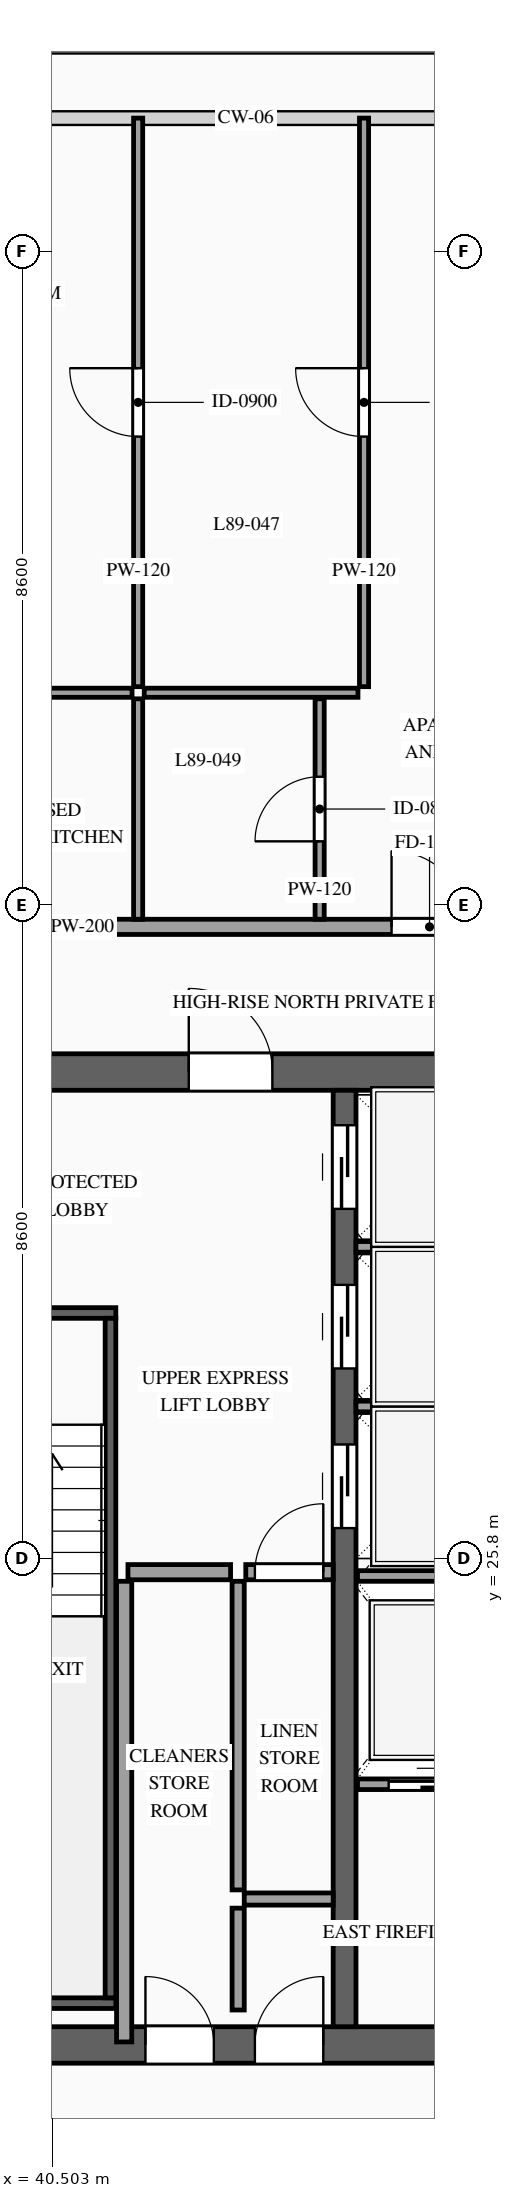
"""IFC4 building model, lengths in metres.
Left out: names, types, materials, properties, quantities, classifications, styles, units other than length and angle.
Written with IfcOpenShell. Run it as: python <this file> out.ifc"""

import sys

from ifc_helpers import new_model, si_unit, direction, frame, frame_2d, origin, place, context, subcontext, project, spatial, rectangle, extrude, source, transform, mapped, element, fill, save


model = new_model("IFC4")
c1 = context("Model", 3, precision=1e-05, world=origin(), true_north=direction((0.0, 1.0)))
c2 = subcontext(c1, "Body", "Model", "MODEL_VIEW")
j1 = project(units=[si_unit("LENGTHUNIT", "METRE"), si_unit("PLANEANGLEUNIT", "RADIAN")], contexts=[c1])
p1 = place(None, origin())
s1 = spatial("IfcSite", under=j1, at=p1, CompositionType="ELEMENT")
p2 = place(p1, origin())
s2 = spatial("IfcBuilding", under=s1, at=p2, CompositionType="ELEMENT")
p3 = place(p2, frame((0.0, 0.0, 332.2)))
s3 = spatial("IfcBuildingStorey", under=s2, at=p3, CompositionType="ELEMENT", Elevation=332.2)
p4 = place(p3, frame((23.56, 19.4, 0.0), z_axis=(0.0, 0.0, 1.0), x_axis=(1.0, 0.0, 0.0)))
e1 = element("IfcWall", 1, at=p4, inside=s3, PredefinedType="SHEAR", context=c2, shape_type="SweptSolid", body=[
    extrude(rectangle(XDim=26.88, YDim=0.48, at=frame_2d((13.44, 0.0))), origin(), (0.0, 0.0, 1.0), 3.5),
])
p5 = place(p4, frame((1.89, 0.0, 0.0)))
e2 = element("IfcOpeningElement", 2, at=p5, cuts=e1, PredefinedType="OPENING", context=c2, shape_type="SweptSolid", body=[
    extrude(rectangle(XDim=1.1, YDim=2.2, at=frame_2d((0.55, 1.1))), frame((0.0, 0.255, 0.0), z_axis=(0.0, -1.0, 0.0), x_axis=(1.0, 0.0, 0.0)), (0.0, 0.0, 1.0), 0.51),
])
p6 = place(p4, frame((9.79, 0.0, 0.0)))
e3 = element("IfcOpeningElement", 3, at=p6, cuts=e1, PredefinedType="OPENING", context=c2, shape_type="SweptSolid", body=[
    extrude(rectangle(XDim=1.1, YDim=2.2, at=frame_2d((0.55, 1.1))), frame((0.0, 0.255, 0.0), z_axis=(0.0, -1.0, 0.0), x_axis=(1.0, 0.0, 0.0)), (0.0, 0.0, 1.0), 0.51),
])
p7 = place(p4, frame((22.99, 0.0, 0.0)))
e4 = element("IfcOpeningElement", 4, at=p7, cuts=e1, PredefinedType="OPENING", context=c2, shape_type="SweptSolid", body=[
    extrude(rectangle(XDim=1.1, YDim=2.2, at=frame_2d((0.55, 1.1))), frame((0.0, 0.255, 0.0), z_axis=(0.0, -1.0, 0.0), x_axis=(1.0, 0.0, 0.0)), (0.0, 0.0, 1.0), 0.51),
])
p8 = place(p4, frame((19.61, 0.0, 0.0)))
e5 = element("IfcOpeningElement", 5, at=p8, cuts=e1, PredefinedType="OPENING", context=c2, shape_type="SweptSolid", body=[
    extrude(rectangle(XDim=0.9, YDim=2.15, at=frame_2d((0.45, 1.075))), frame((0.0, 0.255, 0.0), z_axis=(0.0, -1.0, 0.0), x_axis=(1.0, 0.0, 0.0)), (0.0, 0.0, 1.0), 0.51),
])
p9 = place(p4, frame((18.17, 0.0, 0.0)))
e6 = element("IfcOpeningElement", 6, at=p9, cuts=e1, PredefinedType="OPENING", context=c2, shape_type="SweptSolid", body=[
    extrude(rectangle(XDim=0.9, YDim=2.15, at=frame_2d((0.45, 1.075))), frame((0.0, 0.255, 0.0), z_axis=(0.0, -1.0, 0.0), x_axis=(1.0, 0.0, 0.0)), (0.0, 0.0, 1.0), 0.51),
])
p10 = place(p3, frame((23.56, 32.2, 0.0), z_axis=(0.0, 0.0, 1.0), x_axis=(1.0, 0.0, 0.0)))
e7 = element("IfcWall", 7, at=p10, inside=s3, PredefinedType="SHEAR", context=c2, shape_type="SweptSolid", body=[
    extrude(rectangle(XDim=26.88, YDim=0.48, at=frame_2d((13.44, 0.0))), origin(), (0.0, 0.0, 1.0), 3.5),
])
p11 = place(p10, frame((4.51, 0.0, 0.0)))
e8 = element("IfcOpeningElement", 8, at=p11, cuts=e7, PredefinedType="OPENING", context=c2, shape_type="SweptSolid", body=[
    extrude(rectangle(XDim=0.9, YDim=2.15, at=frame_2d((0.45, 1.075))), frame((0.0, 0.255, 0.0), z_axis=(0.0, -1.0, 0.0), x_axis=(1.0, 0.0, 0.0)), (0.0, 0.0, 1.0), 0.51),
])
p12 = place(p10, frame((9.79, 0.0, 0.0)))
e9 = element("IfcOpeningElement", 9, at=p12, cuts=e7, PredefinedType="OPENING", context=c2, shape_type="SweptSolid", body=[
    extrude(rectangle(XDim=1.1, YDim=2.2, at=frame_2d((0.55, 1.1))), frame((0.0, 0.255, 0.0), z_axis=(0.0, -1.0, 0.0), x_axis=(1.0, 0.0, 0.0)), (0.0, 0.0, 1.0), 0.51),
])
p13 = place(p10, frame((15.64, 0.0, 0.0)))
e10 = element("IfcOpeningElement", 10, at=p13, cuts=e7, PredefinedType="OPENING", context=c2, shape_type="SweptSolid", body=[
    extrude(rectangle(XDim=1.1, YDim=2.2, at=frame_2d((0.55, 1.1))), frame((0.0, 0.255, 0.0), z_axis=(0.0, -1.0, 0.0), x_axis=(1.0, 0.0, 0.0)), (0.0, 0.0, 1.0), 0.51),
])
p14 = place(p10, frame((18.74, 0.0, 0.0)))
e11 = element("IfcOpeningElement", 11, at=p14, cuts=e7, PredefinedType="OPENING", context=c2, shape_type="SweptSolid", body=[
    extrude(rectangle(XDim=1.1, YDim=2.2, at=frame_2d((0.55, 1.1))), frame((0.0, 0.255, 0.0), z_axis=(0.0, -1.0, 0.0), x_axis=(1.0, 0.0, 0.0)), (0.0, 0.0, 1.0), 0.51),
])
p15 = place(p3, frame((44.35, 19.64, 0.0), z_axis=(0.0, 0.0, 1.0), x_axis=(0.0, 1.0, 0.0)))
e12 = element("IfcWall", 12, at=p15, inside=s3, PredefinedType="SOLIDWALL", context=c2, shape_type="SweptSolid", body=[
    extrude(rectangle(XDim=12.32, YDim=0.3, at=frame_2d((6.16, 0.0))), origin(), (0.0, 0.0, 1.0), 3.5),
])
p16 = place(p15, frame((6.56, 0.0, 0.0)))
e13 = element("IfcOpeningElement", 13, at=p16, cuts=e12, PredefinedType="OPENING", context=c2, shape_type="SweptSolid", body=[
    extrude(rectangle(XDim=1.1, YDim=2.2, at=frame_2d((0.55, 1.1))), frame((0.0, 0.165, 0.0), z_axis=(0.0, -1.0, 0.0), x_axis=(1.0, 0.0, 0.0)), (0.0, 0.0, 1.0), 0.33),
])
p17 = place(p15, frame((8.66, 0.0, 0.0)))
e14 = element("IfcOpeningElement", 14, at=p17, cuts=e12, PredefinedType="OPENING", context=c2, shape_type="SweptSolid", body=[
    extrude(rectangle(XDim=1.1, YDim=2.2, at=frame_2d((0.55, 1.1))), frame((0.0, 0.165, 0.0), z_axis=(0.0, -1.0, 0.0), x_axis=(1.0, 0.0, 0.0)), (0.0, 0.0, 1.0), 0.33),
])
p18 = place(p15, frame((10.76, 0.0, 0.0)))
e15 = element("IfcOpeningElement", 15, at=p18, cuts=e12, PredefinedType="OPENING", context=c2, shape_type="SweptSolid", body=[
    extrude(rectangle(XDim=1.1, YDim=2.2, at=frame_2d((0.55, 1.1))), frame((0.0, 0.165, 0.0), z_axis=(0.0, -1.0, 0.0), x_axis=(1.0, 0.0, 0.0)), (0.0, 0.0, 1.0), 0.33),
])
p19 = place(p3, frame((44.52, 22.83, 0.0), z_axis=(0.0, 0.0, 1.0), x_axis=(1.0, 0.0, 0.0)))
e16 = element("IfcWall", 16, at=p19, inside=s3, PredefinedType="SOLIDWALL", context=c2, shape_type="SweptSolid", body=[
    extrude(rectangle(XDim=1.92, YDim=0.14, at=frame_2d((0.96, 0.0))), origin(), (0.0, 0.0, 1.0), 3.28),
])
p20 = place(p19, frame((0.41, 0.0, 0.0)))
e17 = element("IfcOpeningElement", 17, at=p20, cuts=e16, PredefinedType="OPENING", context=c2, shape_type="SweptSolid", body=[
    extrude(rectangle(XDim=1.1, YDim=2.2, at=frame_2d((0.55, 1.1))), frame((0.0, 0.085, 0.0), z_axis=(0.0, -1.0, 0.0), x_axis=(1.0, 0.0, 0.0)), (0.0, 0.0, 1.0), 0.17),
])
m1 = source(origin(), c2, "Body", "SweptSolid", [
    extrude(rectangle(XDim=1.92, YDim=0.14, at=frame_2d((0.96, 0.0))), origin(), (0.0, 0.0, 1.0), 3.28),
])
p21 = place(p3, frame((44.52, 25.57, 0.0), z_axis=(0.0, 0.0, 1.0), x_axis=(1.0, 0.0, 0.0)))
e18 = element("IfcWall", 18, at=p21, inside=s3, PredefinedType="SOLIDWALL", context=c2, shape_type="MappedRepresentation", body=[
    mapped(m1, transform((0.0, 0.0, 0.0), scale=1.0)),
])
m2 = source(origin(), c2, "Body", "SweptSolid", [
    extrude(rectangle(XDim=2.0, YDim=0.14, at=frame_2d((1.0, 0.0))), origin(), (0.0, 0.0, 1.0), 3.28),
])
for number, where, z_axis, x_axis in (
    (19, (44.5, 27.8, 0.0), (0.0, 0.0, 1.0), (1.0, 0.0, 0.0)),
    (20, (44.5, 29.9, 0.0), (0.0, 0.0, 1.0), (1.0, 0.0, 0.0)),
):
    element("IfcWall", number, at=place(p3, frame(where, z_axis=z_axis, x_axis=x_axis)), inside=s3, PredefinedType="SOLIDWALL", context=c2, shape_type="MappedRepresentation", body=[
        mapped(m2, transform((0.0, 0.0, 0.0), scale=1.0)),
    ])
p22 = place(p3, frame((38.2, 29.03, 0.0), z_axis=(0.0, 0.0, 1.0), x_axis=(1.0, 0.0, 0.0)))
e21 = element("IfcWall", 21, at=p22, inside=s3, PredefinedType="SOLIDWALL", context=c2, shape_type="SweptSolid", body=[
    extrude(rectangle(XDim=3.14, YDim=0.14, at=frame_2d((1.57, 0.0))), origin(), (0.0, 0.0, 1.0), 3.28),
])
p23 = place(p22, frame((1.02, 0.0, 0.0)))
e22 = element("IfcOpeningElement", 22, at=p23, cuts=e21, PredefinedType="OPENING", context=c2, shape_type="SweptSolid", body=[
    extrude(rectangle(XDim=1.1, YDim=2.2, at=frame_2d((0.55, 1.1))), frame((0.0, 0.085, 0.0), z_axis=(0.0, -1.0, 0.0), x_axis=(1.0, 0.0, 0.0)), (0.0, 0.0, 1.0), 0.17),
])
m3 = source(origin(), c2, "Body", "SweptSolid", [
    extrude(rectangle(XDim=3.14, YDim=0.14, at=frame_2d((1.57, 0.0))), origin(), (0.0, 0.0, 1.0), 3.28),
])
p24 = place(p3, frame((38.2, 19.95, 0.0), z_axis=(0.0, 0.0, 1.0), x_axis=(1.0, 0.0, 0.0)))
e23 = element("IfcWall", 23, at=p24, inside=s3, PredefinedType="SOLIDWALL", context=c2, shape_type="MappedRepresentation", body=[
    mapped(m3, transform((0.0, 0.0, 0.0), scale=1.0)),
])
m4 = source(origin(), c2, "Body", "SweptSolid", [
    extrude(rectangle(XDim=8.94, YDim=0.14, at=frame_2d((4.47, 0.0))), origin(), (0.0, 0.0, 1.0), 3.28),
])
p25 = place(p3, frame((41.27, 20.02, 0.0), z_axis=(0.0, 0.0, 1.0), x_axis=(0.0, 1.0, 0.0)))
e24 = element("IfcWall", 24, at=p25, inside=s3, PredefinedType="SOLIDWALL", context=c2, shape_type="MappedRepresentation", body=[
    mapped(m4, transform((0.0, 0.0, 0.0), scale=1.0)),
])
m5 = source(origin(), c2, "Body", "SweptSolid", [
    extrude(rectangle(XDim=1.34, YDim=0.16, at=frame_2d((0.67, 0.0))), origin(), (0.0, 0.0, 1.0), 3.28),
])
p26 = place(p3, frame((42.95, 19.86, 0.0), z_axis=(0.0, 0.0, 1.0), x_axis=(0.0, 1.0, 0.0)))
e25 = element("IfcWall", 25, at=p26, inside=s3, PredefinedType="PARTITIONING", context=c2, shape_type="MappedRepresentation", body=[
    mapped(m5, transform((0.0, 0.0, 0.0), scale=1.0)),
])
m6 = source(origin(), c2, "Body", "SweptSolid", [
    extrude(rectangle(XDim=1.17, YDim=0.16, at=frame_2d((0.585, 0.0))), origin(), (0.0, 0.0, 1.0), 3.28),
])
p27 = place(p3, frame((43.03, 21.32, 0.0), z_axis=(0.0, 0.0, 1.0), x_axis=(1.0, 0.0, 0.0)))
e26 = element("IfcWall", 26, at=p27, inside=s3, PredefinedType="PARTITIONING", context=c2, shape_type="MappedRepresentation", body=[
    mapped(m6, transform((0.0, 0.0, 0.0), scale=1.0)),
])
m7 = source(origin(), c2, "Body", "SweptSolid", [
    extrude(rectangle(XDim=6.06, YDim=0.2, at=frame_2d((3.03, 0.0))), origin(), (0.0, 0.0, 1.0), 3.28),
])
p28 = place(p3, frame((41.45, 19.44, 0.0), z_axis=(0.0, 0.0, 1.0), x_axis=(0.0, 1.0, 0.0)))
e27 = element("IfcWall", 27, at=p28, inside=s3, PredefinedType="PARTITIONING", context=c2, shape_type="MappedRepresentation", body=[
    mapped(m7, transform((0.0, 0.0, 0.0), scale=1.0)),
])
m8 = source(origin(), c2, "Body", "SweptSolid", [
    extrude(rectangle(XDim=1.35, YDim=0.2, at=frame_2d((0.675, 0.0))), origin(), (0.0, 0.0, 1.0), 3.28),
])
p29 = place(p3, frame((41.5, 25.62, 0.0), z_axis=(0.0, 0.0, 1.0), x_axis=(1.0, 0.0, 0.0)))
e28 = element("IfcWall", 28, at=p29, inside=s3, PredefinedType="PARTITIONING", context=c2, shape_type="MappedRepresentation", body=[
    mapped(m8, transform((0.0, 0.0, 0.0), scale=1.0)),
])
m9 = source(origin(), c2, "Body", "SweptSolid", [
    extrude(rectangle(XDim=4.06, YDim=0.16, at=frame_2d((2.03, 0.0))), origin(), (0.0, 0.0, 1.0), 3.28),
])
p30 = place(p3, frame((42.95, 21.44, 0.0), z_axis=(0.0, 0.0, 1.0), x_axis=(0.0, 1.0, 0.0)))
e29 = element("IfcWall", 29, at=p30, inside=s3, PredefinedType="PARTITIONING", context=c2, shape_type="MappedRepresentation", body=[
    mapped(m9, transform((0.0, 0.0, 0.0), scale=1.0)),
])
p31 = place(p3, frame((43.05, 25.62, 0.0), z_axis=(0.0, 0.0, 1.0), x_axis=(1.0, 0.0, 0.0)))
e30 = element("IfcWall", 30, at=p31, inside=s3, PredefinedType="PARTITIONING", context=c2, shape_type="SweptSolid", body=[
    extrude(rectangle(XDim=1.15, YDim=0.2, at=frame_2d((0.575, 0.0))), origin(), (0.0, 0.0, 1.0), 3.28),
])
p32 = place(p31, frame((0.12, 0.0, 0.0)))
e31 = element("IfcOpeningElement", 31, at=p32, cuts=e30, PredefinedType="OPENING", context=c2, shape_type="SweptSolid", body=[
    extrude(rectangle(XDim=0.9, YDim=2.15, at=frame_2d((0.45, 1.075))), frame((0.0, 0.115, 0.0), z_axis=(0.0, -1.0, 0.0), x_axis=(1.0, 0.0, 0.0)), (0.0, 0.0, 1.0), 0.23),
])
p33 = place(p3, frame((37.08, 34.11, 0.0), z_axis=(0.0, 0.0, 1.0), x_axis=(1.0, 0.0, 0.0)))
e32 = element("IfcWall", 32, at=p33, inside=s3, PredefinedType="PARTITIONING", context=c2, shape_type="SweptSolid", body=[
    extrude(rectangle(XDim=15.98, YDim=0.2, at=frame_2d((7.99, 0.0))), origin(), (0.0, 0.0, 1.0), 3.28),
])
p34 = place(p33, frame((7.888, 0.0, 0.0)))
e33 = element("IfcOpeningElement", 33, at=p34, cuts=e32, PredefinedType="OPENING", context=c2, shape_type="SweptSolid", body=[
    extrude(rectangle(XDim=1.0, YDim=2.2, at=frame_2d((0.5, 1.1))), frame((0.0, 0.115, 0.0), z_axis=(0.0, -1.0, 0.0), x_axis=(1.0, 0.0, 0.0)), (0.0, 0.0, 1.0), 0.23),
])
p35 = place(p3, frame((37.08, 37.19, 0.0), z_axis=(0.0, 0.0, 1.0), x_axis=(1.0, 0.0, 0.0)))
e34 = element("IfcWall", 34, at=p35, inside=s3, PredefinedType="PARTITIONING", context=c2, shape_type="SweptSolid", body=[
    extrude(rectangle(XDim=4.474, YDim=0.12, at=frame_2d((2.237, 0.0))), origin(), (0.0, 0.0, 1.0), 3.28),
])
p36 = place(p35, frame((1.812, 0.0, 0.0)))
e35 = element("IfcOpeningElement", 35, at=p36, cuts=e34, PredefinedType="OPENING", context=c2, shape_type="SweptSolid", body=[
    extrude(rectangle(XDim=0.85, YDim=2.1, at=frame_2d((0.425, 1.05))), frame((0.0, 0.075, 0.0), z_axis=(0.0, -1.0, 0.0), x_axis=(1.0, 0.0, 0.0)), (0.0, 0.0, 1.0), 0.15),
])
m10 = source(origin(), c2, "Body", "SweptSolid", [
    extrude(rectangle(XDim=2.9, YDim=0.12, at=frame_2d((1.45, 0.0))), origin(), (0.0, 0.0, 1.0), 3.28),
])
p37 = place(p3, frame((41.634, 34.21, 0.0), z_axis=(0.0, 0.0, 1.0), x_axis=(0.0, 1.0, 0.0)))
e36 = element("IfcWall", 36, at=p37, inside=s3, PredefinedType="PARTITIONING", context=c2, shape_type="MappedRepresentation", body=[
    mapped(m10, transform((0.0, 0.0, 0.0), scale=1.0)),
])
p38 = place(p3, frame((44.022, 34.21, 0.0), z_axis=(0.0, 0.0, 1.0), x_axis=(0.0, 1.0, 0.0)))
e37 = element("IfcWall", 37, at=p38, inside=s3, PredefinedType="PARTITIONING", context=c2, shape_type="SweptSolid", body=[
    extrude(rectangle(XDim=2.9, YDim=0.12, at=frame_2d((1.45, 0.0))), origin(), (0.0, 0.0, 1.0), 3.28),
])
p39 = place(p38, frame((1.025, 0.0, 0.0)))
e38 = element("IfcOpeningElement", 38, at=p39, cuts=e37, PredefinedType="OPENING", context=c2, shape_type="SweptSolid", body=[
    extrude(rectangle(XDim=0.85, YDim=2.1, at=frame_2d((0.425, 1.05))), frame((0.0, 0.075, 0.0), z_axis=(0.0, -1.0, 0.0), x_axis=(1.0, 0.0, 0.0)), (0.0, 0.0, 1.0), 0.15),
])
p40 = place(p3, frame((41.634, 37.27, 0.0), z_axis=(0.0, 0.0, 1.0), x_axis=(0.0, 1.0, 0.0)))
e39 = element("IfcWall", 39, at=p40, inside=s3, PredefinedType="PARTITIONING", context=c2, shape_type="SweptSolid", body=[
    extrude(rectangle(XDim=7.48, YDim=0.12, at=frame_2d((3.74, 0.0))), origin(), (0.0, 0.0, 1.0), 3.28),
])
p41 = place(p40, frame((3.29, 0.0, 0.0)))
e40 = element("IfcOpeningElement", 40, at=p41, cuts=e39, PredefinedType="OPENING", context=c2, shape_type="SweptSolid", body=[
    extrude(rectangle(XDim=0.9, YDim=2.15, at=frame_2d((0.45, 1.075))), frame((0.0, 0.075, 0.0), z_axis=(0.0, -1.0, 0.0), x_axis=(1.0, 0.0, 0.0)), (0.0, 0.0, 1.0), 0.15),
])
m11 = source(origin(), c2, "Body", "SweptSolid", [
    extrude(rectangle(XDim=2.812, YDim=0.12, at=frame_2d((1.406, 0.0))), origin(), (0.0, 0.0, 1.0), 3.28),
])
p42 = place(p3, frame((41.714, 37.19, 0.0), z_axis=(0.0, 0.0, 1.0), x_axis=(1.0, 0.0, 0.0)))
e41 = element("IfcWall", 41, at=p42, inside=s3, PredefinedType="PARTITIONING", context=c2, shape_type="MappedRepresentation", body=[
    mapped(m11, transform((0.0, 0.0, 0.0), scale=1.0)),
])
p43 = place(p3, frame((44.606, 37.27, 0.0), z_axis=(0.0, 0.0, 1.0), x_axis=(0.0, 1.0, 0.0)))
e42 = element("IfcWall", 42, at=p43, inside=s3, PredefinedType="PARTITIONING", context=c2, shape_type="SweptSolid", body=[
    extrude(rectangle(XDim=7.48, YDim=0.12, at=frame_2d((3.74, 0.0))), origin(), (0.0, 0.0, 1.0), 3.28),
])
p44 = place(p43, frame((3.29, 0.0, 0.0)))
e43 = element("IfcOpeningElement", 43, at=p44, cuts=e42, PredefinedType="OPENING", context=c2, shape_type="SweptSolid", body=[
    extrude(rectangle(XDim=0.9, YDim=2.15, at=frame_2d((0.45, 1.075))), frame((0.0, 0.075, 0.0), z_axis=(0.0, -1.0, 0.0), x_axis=(1.0, 0.0, 0.0)), (0.0, 0.0, 1.0), 0.15),
])
m12 = source(origin(), c2, "Body", "SweptSolid", [
    extrude(rectangle(XDim=1.1, YDim=2.2, at=frame_2d((0.55, 1.1))), frame((0.0, 0.025, 0.0), z_axis=(0.0, -1.0, 0.0), x_axis=(1.0, 0.0, 0.0)), (0.0, 0.0, 1.0), 0.05),
])
p45 = place(p20, origin())
e44 = element("IfcDoor", 44, at=p45, inside=s3, OperationType="SLIDING_TO_RIGHT", PredefinedType="DOOR", context=c2, shape_type="MappedRepresentation", body=[
    mapped(m12, transform((0.0, 0.0, 0.0), scale=1.0)),
])
fill(e17, e44)
p46 = place(p16, origin())
e45 = element("IfcDoor", 45, at=p46, inside=s3, OperationType="SLIDING_TO_LEFT", PredefinedType="DOOR", context=c2, shape_type="MappedRepresentation", body=[
    mapped(m12, transform((0.0, 0.0, 0.0), scale=1.0)),
])
fill(e13, e45)
p47 = place(p17, origin())
e46 = element("IfcDoor", 46, at=p47, inside=s3, OperationType="SLIDING_TO_RIGHT", PredefinedType="DOOR", context=c2, shape_type="MappedRepresentation", body=[
    mapped(m12, transform((0.0, 0.0, 0.0), scale=1.0)),
])
fill(e14, e46)
p48 = place(p18, origin())
e47 = element("IfcDoor", 47, at=p48, inside=s3, OperationType="SLIDING_TO_LEFT", PredefinedType="DOOR", context=c2, shape_type="MappedRepresentation", body=[
    mapped(m12, transform((0.0, 0.0, 0.0), scale=1.0)),
])
fill(e15, e47)
m13 = source(origin(), c2, "Body", "SweptSolid", [
    extrude(rectangle(XDim=1.1, YDim=2.2, at=frame_2d((0.55, 1.1))), frame((0.0, 0.025, 0.0), z_axis=(0.0, -1.0, 0.0), x_axis=(1.0, 0.0, 0.0)), (0.0, 0.0, 1.0), 0.05),
])
p49 = place(p14, origin())
e48 = element("IfcDoor", 48, at=p49, inside=s3, OperationType="SINGLE_SWING_LEFT", PredefinedType="DOOR", context=c2, shape_type="MappedRepresentation", body=[
    mapped(m13, transform((0.0, 0.0, 0.0), scale=1.0)),
])
fill(e11, e48)
m14 = source(origin(), c2, "Body", "SweptSolid", [
    extrude(rectangle(XDim=0.9, YDim=2.15, at=frame_2d((0.45, 1.075))), frame((0.0, 0.025, 0.0), z_axis=(0.0, -1.0, 0.0), x_axis=(1.0, 0.0, 0.0)), (0.0, 0.0, 1.0), 0.05),
])
p50 = place(p8, origin())
e49 = element("IfcDoor", 49, at=p50, inside=s3, OperationType="SINGLE_SWING_RIGHT", PredefinedType="DOOR", context=c2, shape_type="MappedRepresentation", body=[
    mapped(m14, transform((0.0, 0.0, 0.0), scale=1.0)),
])
fill(e5, e49)
p51 = place(p9, origin())
e50 = element("IfcDoor", 50, at=p51, inside=s3, OperationType="SINGLE_SWING_LEFT", PredefinedType="DOOR", context=c2, shape_type="MappedRepresentation", body=[
    mapped(m14, transform((0.0, 0.0, 0.0), scale=1.0)),
])
fill(e6, e50)
p52 = place(p32, origin())
e51 = element("IfcDoor", 51, at=p52, inside=s3, OperationType="SINGLE_SWING_RIGHT", PredefinedType="DOOR", context=c2, shape_type="MappedRepresentation", body=[
    mapped(m14, transform((0.0, 0.0, 0.0), scale=1.0)),
])
fill(e31, e51)
m15 = source(origin(), c2, "Body", "SweptSolid", [
    extrude(rectangle(XDim=1.0, YDim=2.2, at=frame_2d((0.5, 1.1))), frame((0.0, 0.025, 0.0), z_axis=(0.0, -1.0, 0.0), x_axis=(1.0, 0.0, 0.0)), (0.0, 0.0, 1.0), 0.05),
])
p53 = place(p34, origin())
e52 = element("IfcDoor", 52, at=p53, inside=s3, OperationType="SINGLE_SWING_LEFT", PredefinedType="DOOR", context=c2, shape_type="MappedRepresentation", body=[
    mapped(m15, transform((0.0, 0.0, 0.0), scale=1.0)),
])
fill(e33, e52)
m16 = source(origin(), c2, "Body", "SweptSolid", [
    extrude(rectangle(XDim=0.85, YDim=2.1, at=frame_2d((0.425, 1.05))), frame((0.0, 0.025, 0.0), z_axis=(0.0, -1.0, 0.0), x_axis=(1.0, 0.0, 0.0)), (0.0, 0.0, 1.0), 0.05),
])
p54 = place(p39, origin())
e53 = element("IfcDoor", 53, at=p54, inside=s3, OperationType="SINGLE_SWING_LEFT", PredefinedType="DOOR", context=c2, shape_type="MappedRepresentation", body=[
    mapped(m16, transform((0.0, 0.0, 0.0), scale=1.0)),
])
fill(e38, e53)
m17 = source(origin(), c2, "Body", "SweptSolid", [
    extrude(rectangle(XDim=0.9, YDim=2.15, at=frame_2d((0.45, 1.075))), frame((0.0, 0.025, 0.0), z_axis=(0.0, -1.0, 0.0), x_axis=(1.0, 0.0, 0.0)), (0.0, 0.0, 1.0), 0.05),
])
p55 = place(p41, origin())
e54 = element("IfcDoor", 54, at=p55, inside=s3, OperationType="SINGLE_SWING_RIGHT", PredefinedType="DOOR", context=c2, shape_type="MappedRepresentation", body=[
    mapped(m17, transform((0.0, 0.0, 0.0), scale=1.0)),
])
fill(e40, e54)
p56 = place(p44, origin())
e55 = element("IfcDoor", 55, at=p56, inside=s3, OperationType="SINGLE_SWING_RIGHT", PredefinedType="DOOR", context=c2, shape_type="MappedRepresentation", body=[
    mapped(m17, transform((0.0, 0.0, 0.0), scale=1.0)),
])
fill(e43, e55)
save(model, sys.argv[1])
